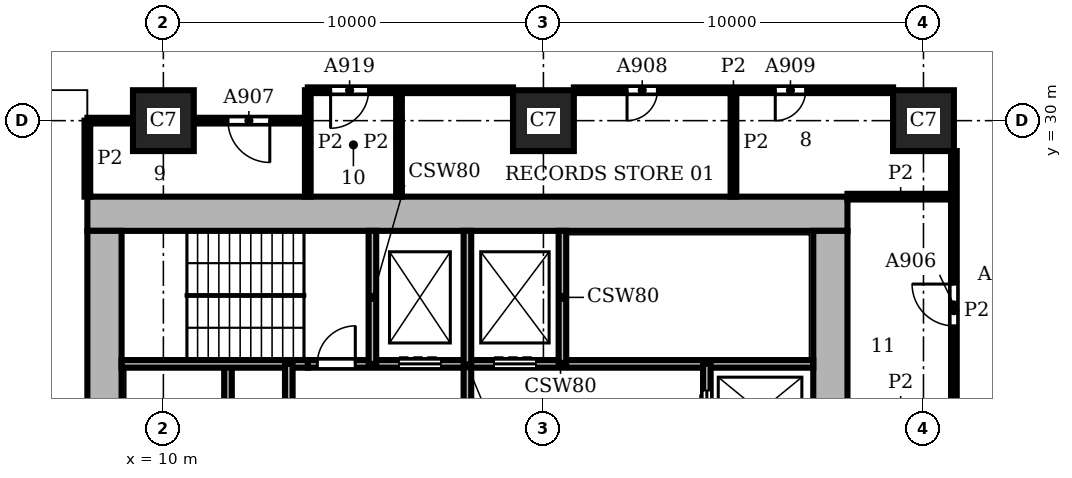
"""IFC4 building model, lengths in metres.
Left out: names, types, materials, properties, quantities, classifications, styles, units other than length and angle.
Written with IfcOpenShell. Run it as: python <this file> out.ifc"""

import sys

from ifc_helpers import new_model, si_unit, direction, frame, frame_2d, origin, origin_2d, place, context, subcontext, project, spatial, rectangle, extrude, element, fill, save


model = new_model("IFC4")
c1 = context("Model", 3, precision=1e-05, world=origin(), true_north=direction((0.0, 1.0)))
c2 = subcontext(c1, "Body", "Model", "MODEL_VIEW")
j1 = project(units=[si_unit("LENGTHUNIT", "METRE"), si_unit("PLANEANGLEUNIT", "RADIAN")], contexts=[c1])
p1 = place(None, origin())
s1 = spatial("IfcSite", under=j1, at=p1, CompositionType="ELEMENT")
p2 = place(p1, origin())
s2 = spatial("IfcBuilding", under=s1, at=p2, CompositionType="ELEMENT")
p3 = place(p2, frame((0.0, 0.0, 105.6)))
s3 = spatial("IfcBuildingStorey", under=s2, at=p3, CompositionType="ELEMENT", Elevation=105.6)
for number, where, z_axis, x_axis in (
    (1, (10.0, 30.0, 0.0), (0.0, 0.0, 1.0), (1.0, 0.0, 0.0)),
    (2, (20.0, 30.0, 0.0), (0.0, 0.0, 1.0), (1.0, 0.0, 0.0)),
    (3, (30.0, 30.0, 0.0), (0.0, 0.0, 1.0), (1.0, 0.0, 0.0)),
):
    element("IfcColumn", number, at=place(p3, frame(where, z_axis=z_axis, x_axis=x_axis)), inside=s3, PredefinedType="COLUMN", context=c2, shape_type="SweptSolid", body=[
        extrude(rectangle(XDim=1.6, YDim=1.6, at=origin_2d()), origin(), (0.0, 0.0, 1.0), 3.9),
    ])
p4 = place(p3, frame((27.55, 8.9, 0.0), z_axis=(0.0, 0.0, 1.0), x_axis=(0.0, 1.0, 0.0)))
e4 = element("IfcWall", 4, at=p4, inside=s3, PredefinedType="SHEAR", context=c2, shape_type="SweptSolid", body=[
    extrude(rectangle(XDim=18.2, YDim=0.9, at=frame_2d((9.1, 0.0))), origin(), (0.0, 0.0, 1.0), 3.9),
])
p5 = place(p4, frame((4.55, 0.0, 0.0)))
e5 = element("IfcOpeningElement", 5, at=p5, cuts=e4, PredefinedType="OPENING", context=c2, shape_type="SweptSolid", body=[
    extrude(rectangle(XDim=1.6, YDim=2.1, at=frame_2d((0.8, 1.05))), frame((0.0, 0.46, 0.0), z_axis=(0.0, -1.0, 0.0), x_axis=(1.0, 0.0, 0.0)), (0.0, 0.0, 1.0), 0.92),
])
p6 = place(p3, frame((28.0, 27.55, 0.0), z_axis=(0.0, 0.0, 1.0), x_axis=(-1.0, 0.0, 0.0)))
e6 = element("IfcWall", 6, at=p6, inside=s3, PredefinedType="SHEAR", context=c2, shape_type="SweptSolid", body=[
    extrude(rectangle(XDim=20.0, YDim=0.9, at=frame_2d((10.0, 0.0))), origin(), (0.0, 0.0, 1.0), 3.9),
])
p7 = place(p3, frame((8.45, 27.1, 0.0), z_axis=(0.0, 0.0, 1.0), x_axis=(0.0, -1.0, 0.0)))
e7 = element("IfcWall", 7, at=p7, inside=s3, PredefinedType="SHEAR", context=c2, shape_type="SweptSolid", body=[
    extrude(rectangle(XDim=18.2, YDim=0.9, at=frame_2d((9.1, 0.0))), origin(), (0.0, 0.0, 1.0), 3.9),
])
p8 = place(p3, frame((8.9, 23.6, 0.0), z_axis=(0.0, 0.0, 1.0), x_axis=(1.0, 0.0, 0.0)))
e8 = element("IfcWall", 8, at=p8, inside=s3, PredefinedType="SHEAR", context=c2, shape_type="SweptSolid", body=[
    extrude(rectangle(XDim=4.9, YDim=0.2, at=frame_2d((2.45, 0.0))), origin(), (0.0, 0.0, 1.0), 3.58),
])
p9 = place(p3, frame((13.8, 23.6, 0.0), z_axis=(0.0, 0.0, 1.0), x_axis=(1.0, 0.0, 0.0)))
e9 = element("IfcWall", 9, at=p9, inside=s3, PredefinedType="SHEAR", context=c2, shape_type="SweptSolid", body=[
    extrude(rectangle(XDim=13.3, YDim=0.2, at=frame_2d((6.65, 0.0))), origin(), (0.0, 0.0, 1.0), 3.58),
])
p10 = place(p9, frame((2.4, 0.0, 0.0)))
e10 = element("IfcOpeningElement", 10, at=p10, cuts=e9, PredefinedType="OPENING", context=c2, shape_type="SweptSolid", body=[
    extrude(rectangle(XDim=1.1, YDim=2.1, at=frame_2d((0.55, 1.05))), frame((0.0, 0.11, 0.0), z_axis=(0.0, -1.0, 0.0), x_axis=(1.0, 0.0, 0.0)), (0.0, 0.0, 1.0), 0.22),
])
p11 = place(p9, frame((4.9, 0.0, 0.0)))
e11 = element("IfcOpeningElement", 11, at=p11, cuts=e9, PredefinedType="OPENING", context=c2, shape_type="SweptSolid", body=[
    extrude(rectangle(XDim=1.1, YDim=2.1, at=frame_2d((0.55, 1.05))), frame((0.0, 0.11, 0.0), z_axis=(0.0, -1.0, 0.0), x_axis=(1.0, 0.0, 0.0)), (0.0, 0.0, 1.0), 0.22),
])
p12 = place(p9, frame((0.25, 0.0, 0.0)))
e12 = element("IfcOpeningElement", 12, at=p12, cuts=e9, PredefinedType="OPENING", context=c2, shape_type="SweptSolid", body=[
    extrude(rectangle(XDim=1.0, YDim=2.1, at=frame_2d((0.5, 1.05))), frame((0.0, 0.11, 0.0), z_axis=(0.0, -1.0, 0.0), x_axis=(1.0, 0.0, 0.0)), (0.0, 0.0, 1.0), 0.22),
])
p13 = place(p3, frame((11.7, 12.4, 0.0), z_axis=(0.0, 0.0, 1.0), x_axis=(0.0, 1.0, 0.0)))
e13 = element("IfcWall", 13, at=p13, inside=s3, PredefinedType="SHEAR", context=c2, shape_type="SweptSolid", body=[
    extrude(rectangle(XDim=11.2, YDim=0.2, at=frame_2d((5.6, 0.0))), origin(), (0.0, 0.0, 1.0), 3.58),
])
p14 = place(p13, frame((0.7, 0.0, 0.0)))
e14 = element("IfcOpeningElement", 14, at=p14, cuts=e13, PredefinedType="OPENING", context=c2, shape_type="SweptSolid", body=[
    extrude(rectangle(XDim=1.1, YDim=2.1, at=frame_2d((0.55, 1.05))), frame((0.0, 0.11, 0.0), z_axis=(0.0, -1.0, 0.0), x_axis=(1.0, 0.0, 0.0)), (0.0, 0.0, 1.0), 0.22),
])
p15 = place(p13, frame((3.2, 0.0, 0.0)))
e15 = element("IfcOpeningElement", 15, at=p15, cuts=e13, PredefinedType="OPENING", context=c2, shape_type="SweptSolid", body=[
    extrude(rectangle(XDim=1.1, YDim=2.1, at=frame_2d((0.55, 1.05))), frame((0.0, 0.11, 0.0), z_axis=(0.0, -1.0, 0.0), x_axis=(1.0, 0.0, 0.0)), (0.0, 0.0, 1.0), 0.22),
])
p16 = place(p13, frame((5.7, 0.0, 0.0)))
e16 = element("IfcOpeningElement", 16, at=p16, cuts=e13, PredefinedType="OPENING", context=c2, shape_type="SweptSolid", body=[
    extrude(rectangle(XDim=1.1, YDim=2.1, at=frame_2d((0.55, 1.05))), frame((0.0, 0.11, 0.0), z_axis=(0.0, -1.0, 0.0), x_axis=(1.0, 0.0, 0.0)), (0.0, 0.0, 1.0), 0.22),
])
p17 = place(p13, frame((8.2, 0.0, 0.0)))
e17 = element("IfcOpeningElement", 17, at=p17, cuts=e13, PredefinedType="OPENING", context=c2, shape_type="SweptSolid", body=[
    extrude(rectangle(XDim=1.1, YDim=2.1, at=frame_2d((0.55, 1.05))), frame((0.0, 0.11, 0.0), z_axis=(0.0, -1.0, 0.0), x_axis=(1.0, 0.0, 0.0)), (0.0, 0.0, 1.0), 0.22),
])
p18 = place(p3, frame((13.3, 20.0, 0.0), z_axis=(0.0, 0.0, 1.0), x_axis=(0.0, 1.0, 0.0)))
e18 = element("IfcWall", 18, at=p18, inside=s3, PredefinedType="SHEAR", context=c2, shape_type="SweptSolid", body=[
    extrude(rectangle(XDim=3.6, YDim=0.2, at=frame_2d((1.8, 0.0))), origin(), (0.0, 0.0, 1.0), 3.58),
])
p19 = place(p3, frame((15.5, 23.6, 0.0), z_axis=(0.0, 0.0, 1.0), x_axis=(0.0, 1.0, 0.0)))
e19 = element("IfcWall", 19, at=p19, inside=s3, PredefinedType="SHEAR", context=c2, shape_type="SweptSolid", body=[
    extrude(rectangle(XDim=3.5, YDim=0.2, at=frame_2d((1.75, 0.0))), origin(), (0.0, 0.0, 1.0), 3.58),
])
p20 = place(p3, frame((18.0, 20.0, 0.0), z_axis=(0.0, 0.0, 1.0), x_axis=(0.0, 1.0, 0.0)))
e20 = element("IfcWall", 20, at=p20, inside=s3, PredefinedType="SHEAR", context=c2, shape_type="SweptSolid", body=[
    extrude(rectangle(XDim=7.1, YDim=0.2, at=frame_2d((3.55, 0.0))), origin(), (0.0, 0.0, 1.0), 3.58),
])
p21 = place(p20, frame((1.2, 0.0, 0.0)))
e21 = element("IfcOpeningElement", 21, at=p21, cuts=e20, PredefinedType="OPENING", context=c2, shape_type="SweptSolid", body=[
    extrude(rectangle(XDim=1.2, YDim=2.1, at=frame_2d((0.6, 1.05))), frame((0.0, 0.11, 0.0), z_axis=(0.0, -1.0, 0.0), x_axis=(1.0, 0.0, 0.0)), (0.0, 0.0, 1.0), 0.22),
])
p22 = place(p3, frame((20.5, 23.6, 0.0), z_axis=(0.0, 0.0, 1.0), x_axis=(0.0, 1.0, 0.0)))
e22 = element("IfcWall", 22, at=p22, inside=s3, PredefinedType="SHEAR", context=c2, shape_type="SweptSolid", body=[
    extrude(rectangle(XDim=3.5, YDim=0.2, at=frame_2d((1.75, 0.0))), origin(), (0.0, 0.0, 1.0), 3.58),
])
p23 = place(p3, frame((24.3, 16.1, 0.0), z_axis=(0.0, 0.0, 1.0), x_axis=(0.0, 1.0, 0.0)))
e23 = element("IfcWall", 23, at=p23, inside=s3, PredefinedType="SHEAR", context=c2, shape_type="SweptSolid", body=[
    extrude(rectangle(XDim=7.5, YDim=0.2, at=frame_2d((3.75, 0.0))), origin(), (0.0, 0.0, 1.0), 3.58),
])
p24 = place(p23, frame((5.7, 0.0, 0.0)))
e24 = element("IfcOpeningElement", 24, at=p24, cuts=e23, PredefinedType="OPENING", context=c2, shape_type="SweptSolid", body=[
    extrude(rectangle(XDim=1.1, YDim=2.1, at=frame_2d((0.55, 1.05))), frame((0.0, 0.11, 0.0), z_axis=(0.0, -1.0, 0.0), x_axis=(1.0, 0.0, 0.0)), (0.0, 0.0, 1.0), 0.22),
])
p25 = place(p3, frame((8.0, 28.0, 0.0), z_axis=(0.0, 0.0, 1.0), x_axis=(0.0, 1.0, 0.0)))
e25 = element("IfcWall", 25, at=p25, inside=s3, PredefinedType="PARTITIONING", context=c2, shape_type="SweptSolid", body=[
    extrude(rectangle(XDim=2.0, YDim=0.15, at=frame_2d((1.0, 0.0))), origin(), (0.0, 0.0, 1.0), 3.58),
])
for number, where, z_axis, x_axis in (
    (26, (13.8, 28.0, 0.0), (0.0, 0.0, 1.0), (0.0, 1.0, 0.0)),
    (27, (16.2, 28.0, 0.0), (0.0, 0.0, 1.0), (0.0, 1.0, 0.0)),
    (28, (25.0, 28.0, 0.0), (0.0, 0.0, 1.0), (0.0, 1.0, 0.0)),
):
    element("IfcWall", number, at=place(p3, frame(where, z_axis=z_axis, x_axis=x_axis)), inside=s3, PredefinedType="PARTITIONING", context=c2, shape_type="SweptSolid", body=[
        extrude(rectangle(XDim=2.8, YDim=0.15, at=frame_2d((1.4, 0.0))), origin(), (0.0, 0.0, 1.0), 3.58),
    ])
p26 = place(p3, frame((30.8, 20.8, 0.0), z_axis=(0.0, 0.0, 1.0), x_axis=(0.0, 1.0, 0.0)))
e29 = element("IfcWall", 29, at=p26, inside=s3, PredefinedType="PARTITIONING", context=c2, shape_type="SweptSolid", body=[
    extrude(rectangle(XDim=8.4, YDim=0.15, at=frame_2d((4.2, 0.0))), origin(), (0.0, 0.0, 1.0), 3.58),
])
p27 = place(p26, frame((3.8, 0.0, 0.0)))
e30 = element("IfcOpeningElement", 30, at=p27, cuts=e29, PredefinedType="OPENING", context=c2, shape_type="SweptSolid", body=[
    extrude(rectangle(XDim=1.1, YDim=2.1, at=frame_2d((0.55, 1.05))), frame((0.0, 0.085, 0.0), z_axis=(0.0, -1.0, 0.0), x_axis=(1.0, 0.0, 0.0)), (0.0, 0.0, 1.0), 0.17),
])
p28 = place(p3, frame((28.0, 28.0, 0.0), z_axis=(0.0, 0.0, 1.0), x_axis=(1.0, 0.0, 0.0)))
e31 = element("IfcWall", 31, at=p28, inside=s3, PredefinedType="PARTITIONING", context=c2, shape_type="SweptSolid", body=[
    extrude(rectangle(XDim=2.8, YDim=0.15, at=frame_2d((1.4, 0.0))), origin(), (0.0, 0.0, 1.0), 3.58),
])
p29 = place(p3, frame((8.0, 30.0, 0.0), z_axis=(0.0, 0.0, 1.0), x_axis=(1.0, 0.0, 0.0)))
e32 = element("IfcWall", 32, at=p29, inside=s3, PredefinedType="PARTITIONING", context=c2, shape_type="SweptSolid", body=[
    extrude(rectangle(XDim=1.2, YDim=0.15, at=frame_2d((0.6, 0.0))), origin(), (0.0, 0.0, 1.0), 3.58),
])
p30 = place(p3, frame((10.8, 30.0, 0.0), z_axis=(0.0, 0.0, 1.0), x_axis=(1.0, 0.0, 0.0)))
e33 = element("IfcWall", 33, at=p30, inside=s3, PredefinedType="PARTITIONING", context=c2, shape_type="SweptSolid", body=[
    extrude(rectangle(XDim=3.0, YDim=0.15, at=frame_2d((1.5, 0.0))), origin(), (0.0, 0.0, 1.0), 3.58),
])
p31 = place(p30, frame((0.9, 0.0, 0.0)))
e34 = element("IfcOpeningElement", 34, at=p31, cuts=e33, PredefinedType="OPENING", context=c2, shape_type="SweptSolid", body=[
    extrude(rectangle(XDim=1.1, YDim=2.1, at=frame_2d((0.55, 1.05))), frame((0.0, 0.085, 0.0), z_axis=(0.0, -1.0, 0.0), x_axis=(1.0, 0.0, 0.0)), (0.0, 0.0, 1.0), 0.17),
])
p32 = place(p3, frame((13.8, 30.8, 0.0), z_axis=(0.0, 0.0, 1.0), x_axis=(1.0, 0.0, 0.0)))
e35 = element("IfcWall", 35, at=p32, inside=s3, PredefinedType="PARTITIONING", context=c2, shape_type="SweptSolid", body=[
    extrude(rectangle(XDim=5.4, YDim=0.15, at=frame_2d((2.7, 0.0))), origin(), (0.0, 0.0, 1.0), 3.58),
])
p33 = place(p32, frame((0.6, 0.0, 0.0)))
e36 = element("IfcOpeningElement", 36, at=p33, cuts=e35, PredefinedType="OPENING", context=c2, shape_type="SweptSolid", body=[
    extrude(rectangle(XDim=1.0, YDim=2.1, at=frame_2d((0.5, 1.05))), frame((0.0, 0.085, 0.0), z_axis=(0.0, -1.0, 0.0), x_axis=(1.0, 0.0, 0.0)), (0.0, 0.0, 1.0), 0.17),
])
p34 = place(p3, frame((20.8, 30.8, 0.0), z_axis=(0.0, 0.0, 1.0), x_axis=(1.0, 0.0, 0.0)))
e37 = element("IfcWall", 37, at=p34, inside=s3, PredefinedType="PARTITIONING", context=c2, shape_type="SweptSolid", body=[
    extrude(rectangle(XDim=8.4, YDim=0.15, at=frame_2d((4.2, 0.0))), origin(), (0.0, 0.0, 1.0), 3.58),
])
p35 = place(p34, frame((1.4, 0.0, 0.0)))
e38 = element("IfcOpeningElement", 38, at=p35, cuts=e37, PredefinedType="OPENING", context=c2, shape_type="SweptSolid", body=[
    extrude(rectangle(XDim=0.8, YDim=2.1, at=frame_2d((0.4, 1.05))), frame((0.0, 0.085, 0.0), z_axis=(0.0, -1.0, 0.0), x_axis=(1.0, 0.0, 0.0)), (0.0, 0.0, 1.0), 0.17),
])
p36 = place(p34, frame((5.3, 0.0, 0.0)))
e39 = element("IfcOpeningElement", 39, at=p36, cuts=e37, PredefinedType="OPENING", context=c2, shape_type="SweptSolid", body=[
    extrude(rectangle(XDim=0.8, YDim=2.1, at=frame_2d((0.4, 1.05))), frame((0.0, 0.085, 0.0), z_axis=(0.0, -1.0, 0.0), x_axis=(1.0, 0.0, 0.0)), (0.0, 0.0, 1.0), 0.17),
])
p37 = place(p24, origin())
e40 = element("IfcDoor", 40, at=p37, inside=s3, OperationType="DOUBLE_DOOR_SLIDING", PredefinedType="DOOR", context=c2, shape_type="SweptSolid", body=[
    extrude(rectangle(XDim=1.1, YDim=2.1, at=frame_2d((0.55, 1.05))), frame((0.0, 0.025, 0.0), z_axis=(0.0, -1.0, 0.0), x_axis=(1.0, 0.0, 0.0)), (0.0, 0.0, 1.0), 0.05),
])
fill(e24, e40)
p38 = place(p10, origin())
e41 = element("IfcDoor", 41, at=p38, inside=s3, OperationType="DOUBLE_DOOR_SLIDING", PredefinedType="DOOR", context=c2, shape_type="SweptSolid", body=[
    extrude(rectangle(XDim=1.1, YDim=2.1, at=frame_2d((0.55, 1.05))), frame((0.0, 0.025, 0.0), z_axis=(0.0, -1.0, 0.0), x_axis=(1.0, 0.0, 0.0)), (0.0, 0.0, 1.0), 0.05),
])
fill(e10, e41)
p39 = place(p11, origin())
e42 = element("IfcDoor", 42, at=p39, inside=s3, OperationType="DOUBLE_DOOR_SLIDING", PredefinedType="DOOR", context=c2, shape_type="SweptSolid", body=[
    extrude(rectangle(XDim=1.1, YDim=2.1, at=frame_2d((0.55, 1.05))), frame((0.0, 0.025, 0.0), z_axis=(0.0, -1.0, 0.0), x_axis=(1.0, 0.0, 0.0)), (0.0, 0.0, 1.0), 0.05),
])
fill(e11, e42)
p40 = place(p12, origin())
e43 = element("IfcDoor", 43, at=p40, inside=s3, OperationType="SINGLE_SWING_RIGHT", PredefinedType="DOOR", context=c2, shape_type="SweptSolid", body=[
    extrude(rectangle(XDim=1.0, YDim=2.1, at=frame_2d((0.5, 1.05))), frame((0.0, 0.025, 0.0), z_axis=(0.0, -1.0, 0.0), x_axis=(1.0, 0.0, 0.0)), (0.0, 0.0, 1.0), 0.05),
])
fill(e12, e43)
p41 = place(p27, origin())
e44 = element("IfcDoor", 44, at=p41, inside=s3, OperationType="SINGLE_SWING_RIGHT", PredefinedType="DOOR", context=c2, shape_type="SweptSolid", body=[
    extrude(rectangle(XDim=1.1, YDim=2.1, at=frame_2d((0.55, 1.05))), frame((0.0, 0.025, 0.0), z_axis=(0.0, -1.0, 0.0), x_axis=(1.0, 0.0, 0.0)), (0.0, 0.0, 1.0), 0.05),
])
fill(e30, e44)
p42 = place(p31, frame((1.1, 0.0, 0.0), z_axis=(0.0, 0.0, 1.0), x_axis=(-1.0, 0.0, 0.0)))
e45 = element("IfcDoor", 45, at=p42, inside=s3, OperationType="SINGLE_SWING_LEFT", PredefinedType="DOOR", context=c2, shape_type="SweptSolid", body=[
    extrude(rectangle(XDim=1.1, YDim=2.1, at=frame_2d((0.55, 1.05))), frame((0.0, 0.025, 0.0), z_axis=(0.0, -1.0, 0.0), x_axis=(1.0, 0.0, 0.0)), (0.0, 0.0, 1.0), 0.05),
])
fill(e34, e45)
p43 = place(p35, frame((0.8, 0.0, 0.0), z_axis=(0.0, 0.0, 1.0), x_axis=(-1.0, 0.0, 0.0)))
e46 = element("IfcDoor", 46, at=p43, inside=s3, OperationType="SINGLE_SWING_RIGHT", PredefinedType="DOOR", context=c2, shape_type="SweptSolid", body=[
    extrude(rectangle(XDim=0.8, YDim=2.1, at=frame_2d((0.4, 1.05))), frame((0.0, 0.025, 0.0), z_axis=(0.0, -1.0, 0.0), x_axis=(1.0, 0.0, 0.0)), (0.0, 0.0, 1.0), 0.05),
])
fill(e38, e46)
p44 = place(p36, frame((0.8, 0.0, 0.0), z_axis=(0.0, 0.0, 1.0), x_axis=(-1.0, 0.0, 0.0)))
e47 = element("IfcDoor", 47, at=p44, inside=s3, OperationType="SINGLE_SWING_RIGHT", PredefinedType="DOOR", context=c2, shape_type="SweptSolid", body=[
    extrude(rectangle(XDim=0.8, YDim=2.1, at=frame_2d((0.4, 1.05))), frame((0.0, 0.025, 0.0), z_axis=(0.0, -1.0, 0.0), x_axis=(1.0, 0.0, 0.0)), (0.0, 0.0, 1.0), 0.05),
])
fill(e39, e47)
p45 = place(p33, frame((1.0, 0.0, 0.0), z_axis=(0.0, 0.0, 1.0), x_axis=(-1.0, 0.0, 0.0)))
e48 = element("IfcDoor", 48, at=p45, inside=s3, OperationType="SINGLE_SWING_RIGHT", PredefinedType="DOOR", context=c2, shape_type="SweptSolid", body=[
    extrude(rectangle(XDim=1.0, YDim=2.1, at=frame_2d((0.5, 1.05))), frame((0.0, 0.025, 0.0), z_axis=(0.0, -1.0, 0.0), x_axis=(1.0, 0.0, 0.0)), (0.0, 0.0, 1.0), 0.05),
])
fill(e36, e48)
save(model, sys.argv[1])
